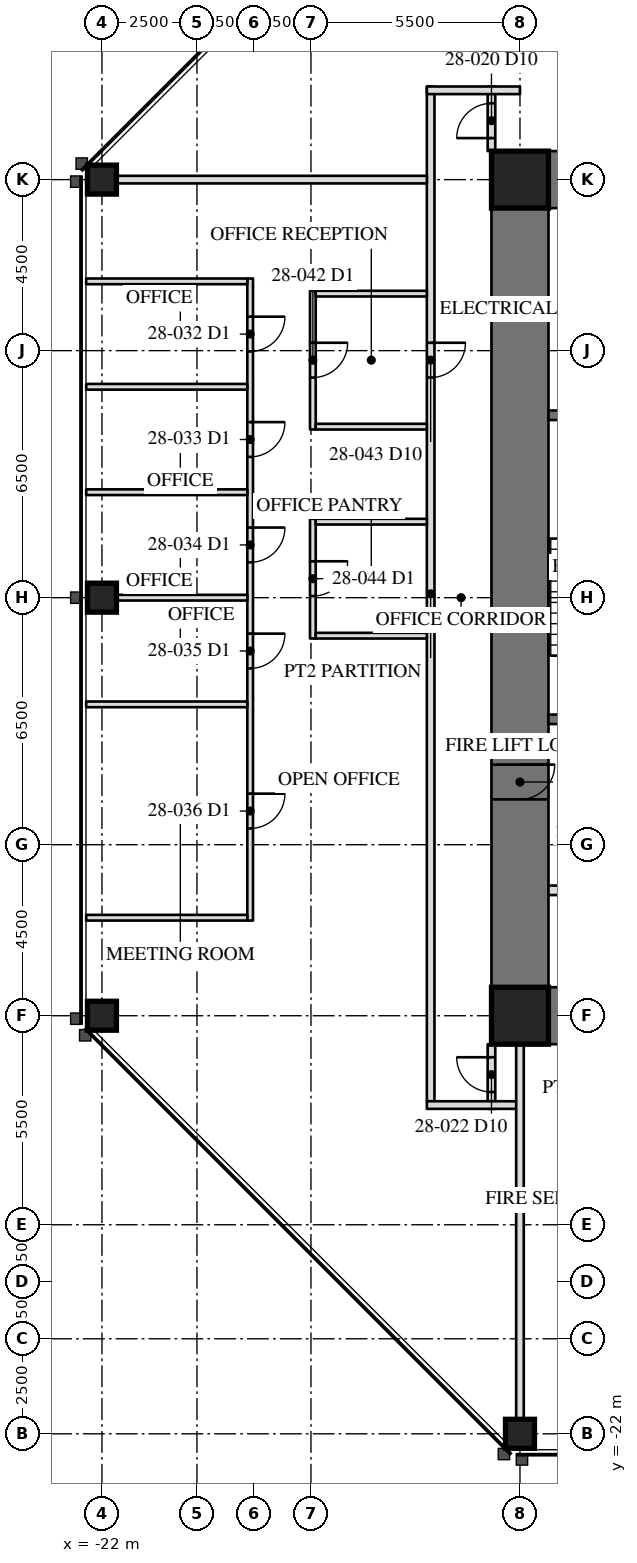
"""IFC4 building model, lengths in metres.
Left out: names, types, materials, properties, quantities, classifications, styles, units other than length and angle.
Written with IfcOpenShell. Run it as: python <this file> out.ifc"""

import sys

from ifc_helpers import new_model, si_unit, direction, frame, frame_2d, origin, origin_2d, place, context, subcontext, project, spatial, rectangle, hollow_rectangle, extrude, element, fill, save


model = new_model("IFC4")
c1 = context("Model", 3, precision=1e-05, world=origin(), true_north=direction((0.0, 1.0)))
c2 = subcontext(c1, "Body", "Model", "MODEL_VIEW")
j1 = project(units=[si_unit("LENGTHUNIT", "METRE"), si_unit("PLANEANGLEUNIT", "RADIAN")], contexts=[c1])
p1 = place(None, origin())
s1 = spatial("IfcSite", under=j1, at=p1, CompositionType="ELEMENT")
p2 = place(p1, origin())
s2 = spatial("IfcBuilding", under=s1, at=p2, CompositionType="ELEMENT")
p3 = place(p2, frame((0.0, 0.0, 121.3)))
s3 = spatial("IfcBuildingStorey", under=s2, at=p3, CompositionType="ELEMENT", Elevation=121.3)
for number, where, z_axis, x_axis in (
    (1, (-22.0, 0.0, 0.0), (0.0, 0.0, 1.0), (0.0, 1.0, 0.0)),
    (2, (-22.0, -11.0, 0.0), (0.0, 0.0, 1.0), (0.0, 1.0, 0.0)),
    (3, (-11.0, -22.0, 0.0), (0.0, 0.0, 1.0), (1.0, 0.0, 0.0)),
    (4, (-22.0, 11.0, 0.0), (0.0, 0.0, 1.0), (0.0, 1.0, 0.0)),
):
    element("IfcColumn", number, at=place(p3, frame(where, z_axis=z_axis, x_axis=x_axis)), inside=s3, PredefinedType="COLUMN", context=c2, shape_type="SweptSolid", body=[
        extrude(hollow_rectangle(XDim=0.762, YDim=0.762, WallThickness=0.127, at=origin_2d()), origin(), (0.0, 0.0, 1.0), 4.1),
    ])
p4 = place(p3, frame((-11.0, 11.0, 0.0), z_axis=(0.0, 0.0, 1.0), x_axis=(0.0, -1.0, 0.0)))
e5 = element("IfcWall", 5, at=p4, inside=s3, PredefinedType="SHEAR", context=c2, shape_type="SweptSolid", body=[
    extrude(rectangle(XDim=22.0, YDim=1.5, at=frame_2d((11.0, 0.0))), origin(), (0.0, 0.0, 1.0), 4.1),
])
p5 = place(p4, frame((15.393, 0.0, 0.0)))
e6 = element("IfcOpeningElement", 6, at=p5, cuts=e5, PredefinedType="OPENING", context=c2, shape_type="SweptSolid", body=[
    extrude(rectangle(XDim=0.915, YDim=2.134, at=frame_2d((0.458, 1.067))), frame((0.0, 0.76, 0.0), z_axis=(0.0, -1.0, 0.0), x_axis=(1.0, 0.0, 0.0)), (0.0, 0.0, 1.0), 1.52),
])
for number, where, z_axis, x_axis in (
    (7, (-6.5, 11.0, 0.0), (0.0, 0.0, 1.0), (-1.0, 0.0, 0.0)),
    (8, (-11.0, -11.0, 0.0), (0.0, 0.0, 1.0), (1.0, 0.0, 0.0)),
):
    element("IfcWall", number, at=place(p3, frame(where, z_axis=z_axis, x_axis=x_axis)), inside=s3, PredefinedType="SHEAR", context=c2, shape_type="SweptSolid", body=[
        extrude(rectangle(XDim=4.5, YDim=1.5, at=frame_2d((2.25, 0.0))), origin(), (0.0, 0.0, 1.0), 4.1),
    ])
for number, where, z_axis, x_axis in (
    (9, (-11.0, 11.0, 0.0), (0.0, 0.0, 1.0), (1.0, 0.0, 0.0)),
    (10, (-11.0, -11.0, 0.0), (0.0, 0.0, 1.0), (1.0, 0.0, 0.0)),
):
    element("IfcColumn", number, at=place(p3, frame(where, z_axis=z_axis, x_axis=x_axis)), inside=s3, PredefinedType="COLUMN", context=c2, shape_type="SweptSolid", body=[
        extrude(hollow_rectangle(XDim=1.499, YDim=1.499, WallThickness=0.102, at=origin_2d()), origin(), (0.0, 0.0, 1.0), 4.1),
    ])
p6 = place(p3, frame((-6.95, 4.8, 0.0), z_axis=(0.0, 0.0, 1.0), x_axis=(-1.0, 0.0, 0.0)))
e11 = element("IfcWall", 11, at=p6, inside=s3, PredefinedType="SOLIDWALL", context=c2, shape_type="SweptSolid", body=[
    extrude(rectangle(XDim=3.3, YDim=0.25, at=frame_2d((1.65, 0.0))), origin(), (0.0, 0.0, 1.0), 3.91),
])
p7 = place(p3, frame((-6.95, -3.2, 0.0), z_axis=(0.0, 0.0, 1.0), x_axis=(-1.0, 0.0, 0.0)))
e12 = element("IfcWall", 12, at=p7, inside=s3, PredefinedType="SOLIDWALL", context=c2, shape_type="SweptSolid", body=[
    extrude(rectangle(XDim=3.3, YDim=0.25, at=frame_2d((1.65, 0.0))), origin(), (0.0, 0.0, 1.0), 3.91),
])
p8 = place(p7, frame((1.116, 0.0, 0.0)))
e13 = element("IfcOpeningElement", 13, at=p8, cuts=e12, PredefinedType="OPENING", context=c2, shape_type="SweptSolid", body=[
    extrude(rectangle(XDim=1.067, YDim=2.134, at=frame_2d((0.533, 1.067))), frame((0.0, 0.135, 0.0), z_axis=(0.0, -1.0, 0.0), x_axis=(1.0, 0.0, 0.0)), (0.0, 0.0, 1.0), 0.27),
])
p9 = place(p3, frame((-6.95, -7.7, 0.0), z_axis=(0.0, 0.0, 1.0), x_axis=(-1.0, 0.0, 0.0)))
e14 = element("IfcWall", 14, at=p9, inside=s3, PredefinedType="PARTITIONING", context=c2, shape_type="SweptSolid", body=[
    extrude(rectangle(XDim=3.3, YDim=0.25, at=frame_2d((1.65, 0.0))), origin(), (0.0, 0.0, 1.0), 3.91),
])
p10 = place(p9, frame((0.45, 0.0, 0.0)))
e15 = element("IfcOpeningElement", 15, at=p10, cuts=e14, PredefinedType="OPENING", context=c2, shape_type="SweptSolid", body=[
    extrude(rectangle(XDim=1.219, YDim=2.134, at=frame_2d((0.609, 1.067))), frame((0.0, 0.135, 0.0), z_axis=(0.0, -1.0, 0.0), x_axis=(1.0, 0.0, 0.0)), (0.0, 0.0, 1.0), 0.27),
])
p11 = place(p3, frame((-13.35, 13.45, 0.0), z_axis=(0.0, 0.0, 1.0), x_axis=(0.0, -1.0, 0.0)))
e16 = element("IfcWall", 16, at=p11, inside=s3, PredefinedType="PARTITIONING", context=c2, shape_type="SweptSolid", body=[
    extrude(rectangle(XDim=26.7, YDim=0.2, at=frame_2d((13.35, 0.0))), origin(), (0.0, 0.0, 1.0), 3.91),
])
p12 = place(p11, frame((6.742, 0.0, 0.0)))
e17 = element("IfcOpeningElement", 17, at=p12, cuts=e16, PredefinedType="OPENING", context=c2, shape_type="SweptSolid", body=[
    extrude(rectangle(XDim=0.915, YDim=2.134, at=frame_2d((0.458, 1.067))), frame((0.0, 0.11, 0.0), z_axis=(0.0, -1.0, 0.0), x_axis=(1.0, 0.0, 0.0)), (0.0, 0.0, 1.0), 0.22),
])
p13 = place(p3, frame((-11.75, 11.75, 0.0), z_axis=(0.0, 0.0, 1.0), x_axis=(0.0, 1.0, 0.0)))
e18 = element("IfcWall", 18, at=p13, inside=s3, PredefinedType="PARTITIONING", context=c2, shape_type="SweptSolid", body=[
    extrude(rectangle(XDim=1.7, YDim=0.2, at=frame_2d((0.85, 0.0))), origin(), (0.0, 0.0, 1.0), 3.91),
])
p14 = place(p13, frame((0.343, 0.0, 0.0)))
e19 = element("IfcOpeningElement", 19, at=p14, cuts=e18, PredefinedType="OPENING", context=c2, shape_type="SweptSolid", body=[
    extrude(rectangle(XDim=0.915, YDim=2.134, at=frame_2d((0.458, 1.067))), frame((0.0, 0.11, 0.0), z_axis=(0.0, -1.0, 0.0), x_axis=(1.0, 0.0, 0.0)), (0.0, 0.0, 1.0), 0.22),
])
p15 = place(p3, frame((-11.0, 13.35, 0.0), z_axis=(0.0, 0.0, 1.0), x_axis=(-1.0, 0.0, 0.0)))
e20 = element("IfcWall", 20, at=p15, inside=s3, PredefinedType="PARTITIONING", context=c2, shape_type="SweptSolid", body=[
    extrude(rectangle(XDim=2.45, YDim=0.2, at=frame_2d((1.225, 0.0))), origin(), (0.0, 0.0, 1.0), 3.91),
])
p16 = place(p3, frame((-11.75, -11.75, 0.0), z_axis=(0.0, 0.0, 1.0), x_axis=(0.0, -1.0, 0.0)))
e21 = element("IfcWall", 21, at=p16, inside=s3, PredefinedType="PARTITIONING", context=c2, shape_type="SweptSolid", body=[
    extrude(rectangle(XDim=1.7, YDim=0.2, at=frame_2d((0.85, 0.0))), origin(), (0.0, 0.0, 1.0), 3.91),
])
p17 = place(p16, frame((0.343, 0.0, 0.0)))
e22 = element("IfcOpeningElement", 22, at=p17, cuts=e21, PredefinedType="OPENING", context=c2, shape_type="SweptSolid", body=[
    extrude(rectangle(XDim=0.915, YDim=2.134, at=frame_2d((0.458, 1.067))), frame((0.0, 0.11, 0.0), z_axis=(0.0, -1.0, 0.0), x_axis=(1.0, 0.0, 0.0)), (0.0, 0.0, 1.0), 0.22),
])
p18 = place(p3, frame((-11.0, -13.35, 0.0), z_axis=(0.0, 0.0, 1.0), x_axis=(-1.0, 0.0, 0.0)))
e23 = element("IfcWall", 23, at=p18, inside=s3, PredefinedType="PARTITIONING", context=c2, shape_type="SweptSolid", body=[
    extrude(rectangle(XDim=2.45, YDim=0.2, at=frame_2d((1.225, 0.0))), origin(), (0.0, 0.0, 1.0), 3.91),
])
p19 = place(p3, frame((-13.45, 11.0, 0.0), z_axis=(0.0, 0.0, 1.0), x_axis=(-1.0, 0.0, 0.0)))
e24 = element("IfcWall", 24, at=p19, inside=s3, PredefinedType="PARTITIONING", context=c2, shape_type="SweptSolid", body=[
    extrude(rectangle(XDim=8.965, YDim=0.2, at=frame_2d((4.482, 0.0))), origin(), (0.0, 0.0, 1.0), 3.326),
])
p20 = place(p3, frame((-11.0, -11.75, 0.0), z_axis=(0.0, 0.0, 1.0), x_axis=(0.0, -1.0, 0.0)))
e25 = element("IfcWall", 25, at=p20, inside=s3, PredefinedType="PARTITIONING", context=c2, shape_type="SweptSolid", body=[
    extrude(rectangle(XDim=10.665, YDim=0.2, at=frame_2d((5.333, 0.0))), origin(), (0.0, 0.0, 1.0), 3.326),
])
p21 = place(p3, frame((-18.1, 8.398, 0.0), z_axis=(0.0, 0.0, 1.0), x_axis=(0.0, -1.0, 0.0)))
e26 = element("IfcWall", 26, at=p21, inside=s3, PredefinedType="PARTITIONING", context=c2, shape_type="SweptSolid", body=[
    extrude(rectangle(XDim=16.894, YDim=0.15, at=frame_2d((8.447, 0.0))), origin(), (0.0, 0.0, 1.0), 3.91),
])
p22 = place(p21, frame((1.004, 0.0, 0.0)))
e27 = element("IfcOpeningElement", 27, at=p22, cuts=e26, PredefinedType="OPENING", context=c2, shape_type="SweptSolid", body=[
    extrude(rectangle(XDim=0.915, YDim=2.134, at=frame_2d((0.458, 1.067))), frame((0.0, 0.085, 0.0), z_axis=(0.0, -1.0, 0.0), x_axis=(1.0, 0.0, 0.0)), (0.0, 0.0, 1.0), 0.17),
])
p23 = place(p21, frame((3.779, 0.0, 0.0)))
e28 = element("IfcOpeningElement", 28, at=p23, cuts=e26, PredefinedType="OPENING", context=c2, shape_type="SweptSolid", body=[
    extrude(rectangle(XDim=0.915, YDim=2.134, at=frame_2d((0.458, 1.067))), frame((0.0, 0.085, 0.0), z_axis=(0.0, -1.0, 0.0), x_axis=(1.0, 0.0, 0.0)), (0.0, 0.0, 1.0), 0.17),
])
p24 = place(p21, frame((6.553, 0.0, 0.0)))
e29 = element("IfcOpeningElement", 29, at=p24, cuts=e26, PredefinedType="OPENING", context=c2, shape_type="SweptSolid", body=[
    extrude(rectangle(XDim=0.915, YDim=2.134, at=frame_2d((0.458, 1.067))), frame((0.0, 0.085, 0.0), z_axis=(0.0, -1.0, 0.0), x_axis=(1.0, 0.0, 0.0)), (0.0, 0.0, 1.0), 0.17),
])
p25 = place(p21, frame((9.344, 0.0, 0.0)))
e30 = element("IfcOpeningElement", 30, at=p25, cuts=e26, PredefinedType="OPENING", context=c2, shape_type="SweptSolid", body=[
    extrude(rectangle(XDim=0.915, YDim=2.134, at=frame_2d((0.458, 1.067))), frame((0.0, 0.085, 0.0), z_axis=(0.0, -1.0, 0.0), x_axis=(1.0, 0.0, 0.0)), (0.0, 0.0, 1.0), 0.17),
])
p26 = place(p21, frame((13.554, 0.0, 0.0)))
e31 = element("IfcOpeningElement", 31, at=p26, cuts=e26, PredefinedType="OPENING", context=c2, shape_type="SweptSolid", body=[
    extrude(rectangle(XDim=0.915, YDim=2.134, at=frame_2d((0.458, 1.067))), frame((0.0, 0.085, 0.0), z_axis=(0.0, -1.0, 0.0), x_axis=(1.0, 0.0, 0.0)), (0.0, 0.0, 1.0), 0.17),
])
for number, where, z_axis, x_axis in (
    (32, (-18.175, 8.323, 0.0), (0.0, 0.0, 1.0), (-1.0, 0.0, 0.0)),
    (33, (-18.175, 5.549, 0.0), (0.0, 0.0, 1.0), (-1.0, 0.0, 0.0)),
    (34, (-18.175, 2.775, 0.0), (0.0, 0.0, 1.0), (-1.0, 0.0, 0.0)),
):
    element("IfcWall", number, at=place(p3, frame(where, z_axis=z_axis, x_axis=x_axis)), inside=s3, PredefinedType="PARTITIONING", context=c2, shape_type="SweptSolid", body=[
        extrude(rectangle(XDim=4.24, YDim=0.15, at=frame_2d((2.12, 0.0))), origin(), (0.0, 0.0, 1.0), 3.91),
    ])
p27 = place(p3, frame((-18.175, 0.0, 0.0), z_axis=(0.0, 0.0, 1.0), x_axis=(-1.0, 0.0, 0.0)))
e35 = element("IfcWall", 35, at=p27, inside=s3, PredefinedType="PARTITIONING", context=c2, shape_type="SweptSolid", body=[
    extrude(rectangle(XDim=4.24, YDim=0.15, at=frame_2d((2.12, 0.0))), origin(), (0.0, 0.0, 1.0), 3.326),
])
for number, where, z_axis, x_axis in (
    (36, (-18.175, -2.807, 0.0), (0.0, 0.0, 1.0), (-1.0, 0.0, 0.0)),
    (37, (-18.175, -8.421, 0.0), (0.0, 0.0, 1.0), (-1.0, 0.0, 0.0)),
):
    element("IfcWall", number, at=place(p3, frame(where, z_axis=z_axis, x_axis=x_axis)), inside=s3, PredefinedType="PARTITIONING", context=c2, shape_type="SweptSolid", body=[
        extrude(rectangle(XDim=4.24, YDim=0.15, at=frame_2d((2.12, 0.0))), origin(), (0.0, 0.0, 1.0), 3.91),
    ])
p28 = place(p3, frame((-16.45, 8.075, 0.0), z_axis=(0.0, 0.0, 1.0), x_axis=(0.0, -1.0, 0.0)))
e38 = element("IfcWall", 38, at=p28, inside=s3, PredefinedType="PARTITIONING", context=c2, shape_type="SweptSolid", body=[
    extrude(rectangle(XDim=3.65, YDim=0.15, at=frame_2d((1.825, 0.0))), origin(), (0.0, 0.0, 1.0), 3.91),
])
p29 = place(p28, frame((1.367, 0.0, 0.0)))
e39 = element("IfcOpeningElement", 39, at=p29, cuts=e38, PredefinedType="OPENING", context=c2, shape_type="SweptSolid", body=[
    extrude(rectangle(XDim=0.915, YDim=2.134, at=frame_2d((0.458, 1.067))), frame((0.0, 0.085, 0.0), z_axis=(0.0, -1.0, 0.0), x_axis=(1.0, 0.0, 0.0)), (0.0, 0.0, 1.0), 0.17),
])
for number, where, z_axis, x_axis in (
    (40, (-16.375, 8.0, 0.0), (0.0, 0.0, 1.0), (1.0, 0.0, 0.0)),
    (41, (-16.375, 4.5, 0.0), (0.0, 0.0, 1.0), (1.0, 0.0, 0.0)),
):
    element("IfcWall", number, at=place(p3, frame(where, z_axis=z_axis, x_axis=x_axis)), inside=s3, PredefinedType="PARTITIONING", context=c2, shape_type="SweptSolid", body=[
        extrude(rectangle(XDim=2.925, YDim=0.15, at=frame_2d((1.462, 0.0))), origin(), (0.0, 0.0, 1.0), 3.91),
    ])
p30 = place(p3, frame((-16.45, 2.075, 0.0), z_axis=(0.0, 0.0, 1.0), x_axis=(0.0, -1.0, 0.0)))
e42 = element("IfcWall", 42, at=p30, inside=s3, PredefinedType="PARTITIONING", context=c2, shape_type="SweptSolid", body=[
    extrude(rectangle(XDim=3.15, YDim=0.15, at=frame_2d((1.575, 0.0))), origin(), (0.0, 0.0, 1.0), 3.91),
])
p31 = place(p30, frame((1.117, 0.0, 0.0)))
e43 = element("IfcOpeningElement", 43, at=p31, cuts=e42, PredefinedType="OPENING", context=c2, shape_type="SweptSolid", body=[
    extrude(rectangle(XDim=0.915, YDim=2.134, at=frame_2d((0.458, 1.067))), frame((0.0, 0.085, 0.0), z_axis=(0.0, -1.0, 0.0), x_axis=(1.0, 0.0, 0.0)), (0.0, 0.0, 1.0), 0.17),
])
for number, where, z_axis, x_axis in (
    (44, (-16.375, 2.0, 0.0), (0.0, 0.0, 1.0), (1.0, 0.0, 0.0)),
    (45, (-16.375, -1.0, 0.0), (0.0, 0.0, 1.0), (1.0, 0.0, 0.0)),
):
    element("IfcWall", number, at=place(p3, frame(where, z_axis=z_axis, x_axis=x_axis)), inside=s3, PredefinedType="PARTITIONING", context=c2, shape_type="SweptSolid", body=[
        extrude(rectangle(XDim=2.925, YDim=0.15, at=frame_2d((1.462, 0.0))), origin(), (0.0, 0.0, 1.0), 3.91),
    ])
p32 = place(p5, origin())
e46 = element("IfcDoor", 46, at=p32, inside=s3, OperationType="SINGLE_SWING_RIGHT", PredefinedType="DOOR", context=c2, shape_type="SweptSolid", body=[
    extrude(rectangle(XDim=0.915, YDim=2.134, at=frame_2d((0.458, 1.067))), frame((0.0, -0.675, 0.0), z_axis=(0.0, -1.0, 0.0), x_axis=(1.0, 0.0, 0.0)), (0.0, 0.0, 1.0), 0.05),
])
fill(e6, e46)
p33 = place(p14, origin())
e47 = element("IfcDoor", 47, at=p33, inside=s3, OperationType="SINGLE_SWING_LEFT", PredefinedType="DOOR", context=c2, shape_type="SweptSolid", body=[
    extrude(rectangle(XDim=0.915, YDim=2.134, at=frame_2d((0.458, 1.067))), frame((0.0, 0.025, 0.0), z_axis=(0.0, -1.0, 0.0), x_axis=(1.0, 0.0, 0.0)), (0.0, 0.0, 1.0), 0.05),
])
fill(e19, e47)
p34 = place(p17, frame((0.915, 0.0, 0.0), z_axis=(0.0, 0.0, 1.0), x_axis=(-1.0, 0.0, 0.0)))
e48 = element("IfcDoor", 48, at=p34, inside=s3, OperationType="SINGLE_SWING_LEFT", PredefinedType="DOOR", context=c2, shape_type="SweptSolid", body=[
    extrude(rectangle(XDim=0.915, YDim=2.134, at=frame_2d((0.458, 1.067))), frame((0.0, 0.025, 0.0), z_axis=(0.0, -1.0, 0.0), x_axis=(1.0, 0.0, 0.0)), (0.0, 0.0, 1.0), 0.05),
])
fill(e22, e48)
p35 = place(p22, origin())
e49 = element("IfcDoor", 49, at=p35, inside=s3, OperationType="SINGLE_SWING_LEFT", PredefinedType="DOOR", context=c2, shape_type="SweptSolid", body=[
    extrude(rectangle(XDim=0.915, YDim=2.134, at=frame_2d((0.458, 1.067))), frame((0.0, 0.025, 0.0), z_axis=(0.0, -1.0, 0.0), x_axis=(1.0, 0.0, 0.0)), (0.0, 0.0, 1.0), 0.05),
])
fill(e27, e49)
p36 = place(p23, origin())
e50 = element("IfcDoor", 50, at=p36, inside=s3, OperationType="SINGLE_SWING_LEFT", PredefinedType="DOOR", context=c2, shape_type="SweptSolid", body=[
    extrude(rectangle(XDim=0.915, YDim=2.134, at=frame_2d((0.458, 1.067))), frame((0.0, 0.025, 0.0), z_axis=(0.0, -1.0, 0.0), x_axis=(1.0, 0.0, 0.0)), (0.0, 0.0, 1.0), 0.05),
])
fill(e28, e50)
p37 = place(p24, origin())
e51 = element("IfcDoor", 51, at=p37, inside=s3, OperationType="SINGLE_SWING_LEFT", PredefinedType="DOOR", context=c2, shape_type="SweptSolid", body=[
    extrude(rectangle(XDim=0.915, YDim=2.134, at=frame_2d((0.458, 1.067))), frame((0.0, 0.025, 0.0), z_axis=(0.0, -1.0, 0.0), x_axis=(1.0, 0.0, 0.0)), (0.0, 0.0, 1.0), 0.05),
])
fill(e29, e51)
p38 = place(p25, origin())
e52 = element("IfcDoor", 52, at=p38, inside=s3, OperationType="SINGLE_SWING_LEFT", PredefinedType="DOOR", context=c2, shape_type="SweptSolid", body=[
    extrude(rectangle(XDim=0.915, YDim=2.134, at=frame_2d((0.458, 1.067))), frame((0.0, 0.025, 0.0), z_axis=(0.0, -1.0, 0.0), x_axis=(1.0, 0.0, 0.0)), (0.0, 0.0, 1.0), 0.05),
])
fill(e30, e52)
p39 = place(p26, origin())
e53 = element("IfcDoor", 53, at=p39, inside=s3, OperationType="SINGLE_SWING_LEFT", PredefinedType="DOOR", context=c2, shape_type="SweptSolid", body=[
    extrude(rectangle(XDim=0.915, YDim=2.134, at=frame_2d((0.458, 1.067))), frame((0.0, 0.025, 0.0), z_axis=(0.0, -1.0, 0.0), x_axis=(1.0, 0.0, 0.0)), (0.0, 0.0, 1.0), 0.05),
])
fill(e31, e53)
p40 = place(p29, origin())
e54 = element("IfcDoor", 54, at=p40, inside=s3, OperationType="SINGLE_SWING_LEFT", PredefinedType="DOOR", context=c2, shape_type="SweptSolid", body=[
    extrude(rectangle(XDim=0.915, YDim=2.134, at=frame_2d((0.458, 1.067))), frame((0.0, 0.025, 0.0), z_axis=(0.0, -1.0, 0.0), x_axis=(1.0, 0.0, 0.0)), (0.0, 0.0, 1.0), 0.05),
])
fill(e39, e54)
p41 = place(p12, origin())
e55 = element("IfcDoor", 55, at=p41, inside=s3, OperationType="SINGLE_SWING_LEFT", PredefinedType="DOOR", context=c2, shape_type="SweptSolid", body=[
    extrude(rectangle(XDim=0.915, YDim=2.134, at=frame_2d((0.458, 1.067))), frame((0.0, 0.025, 0.0), z_axis=(0.0, -1.0, 0.0), x_axis=(1.0, 0.0, 0.0)), (0.0, 0.0, 1.0), 0.05),
])
fill(e17, e55)
p42 = place(p31, origin())
e56 = element("IfcDoor", 56, at=p42, inside=s3, OperationType="SINGLE_SWING_LEFT", PredefinedType="DOOR", context=c2, shape_type="SweptSolid", body=[
    extrude(rectangle(XDim=0.915, YDim=2.134, at=frame_2d((0.458, 1.067))), frame((0.0, 0.025, 0.0), z_axis=(0.0, -1.0, 0.0), x_axis=(1.0, 0.0, 0.0)), (0.0, 0.0, 1.0), 0.05),
])
fill(e43, e56)
save(model, sys.argv[1])
